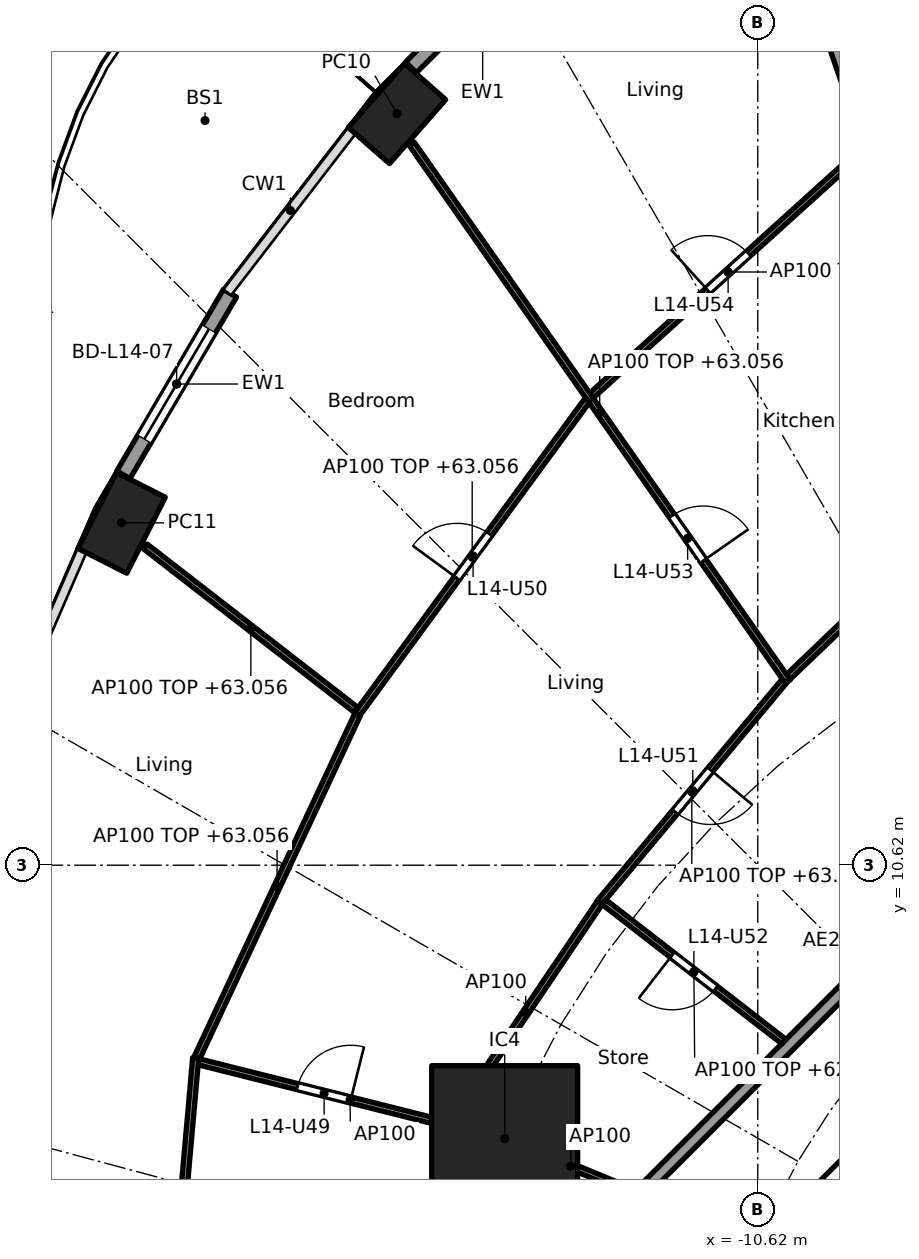
"""IFC4 building model, lengths in metres.
Left out: names, types, materials, properties, quantities, classifications, styles, units other than length and angle.
Written with IfcOpenShell. Run it as: python <this file> out.ifc"""

import sys

from ifc_helpers import new_model, si_unit, direction, frame, frame_2d, origin, origin_2d, place, context, subcontext, project, spatial, rectangle, hollow_rectangle, extrude, element, fill, save


model = new_model("IFC4")
c1 = context("Model", 3, precision=1e-05, world=origin(), true_north=direction((0.0, 1.0)))
c2 = subcontext(c1, "Body", "Model", "MODEL_VIEW")
j1 = project(units=[si_unit("LENGTHUNIT", "METRE"), si_unit("PLANEANGLEUNIT", "RADIAN")], contexts=[c1])
p1 = place(None, origin())
s1 = spatial("IfcSite", under=j1, at=p1, CompositionType="ELEMENT")
p2 = place(p1, origin())
s2 = spatial("IfcBuilding", under=s1, at=p2, CompositionType="ELEMENT")
p3 = place(p2, frame((0.0, 0.0, 60.3)))
s3 = spatial("IfcBuildingStorey", under=s2, at=p3, CompositionType="ELEMENT", Elevation=60.3)
for number, where, z_axis, x_axis in (
    (1, (-16.552, 22.981, 0.0), (0.0, 0.0, 1.0), (-0.66, -0.751, 0.0)),
    (2, (-21.082, 16.25, 0.0), (0.0, 0.0, 1.0), (-0.452, -0.892, 0.0)),
):
    element("IfcColumn", number, at=place(p3, frame(where, z_axis=z_axis, x_axis=x_axis)), inside=s3, PredefinedType="COLUMN", context=c2, shape_type="SweptSolid", body=[
        extrude(hollow_rectangle(XDim=1.4, YDim=0.9, WallThickness=0.05, at=origin_2d()), origin(), (0.0, 0.0, 1.0), 3.7),
    ])
p4 = place(p3, frame((-14.782, 6.123, 0.0), z_axis=(0.0, 0.0, 1.0), x_axis=(1.0, 0.0, 0.0)))
e3 = element("IfcColumn", 3, at=p4, inside=s3, PredefinedType="COLUMN", context=c2, shape_type="SweptSolid", body=[
    extrude(rectangle(XDim=2.4, YDim=2.4, at=origin_2d()), origin(), (0.0, 0.0, 1.0), 3.7),
])
p5 = place(p3, frame((-16.322, 23.74, 0.0), z_axis=(0.0, 0.0, 1.0), x_axis=(0.707803094595, 0.706409781417, 0.0)))
e4 = element("IfcWall", 4, at=p5, inside=s3, PredefinedType="SOLIDWALL", context=c2, shape_type="SweptSolid", body=[
    extrude(rectangle(XDim=3.329, YDim=0.25, at=frame_2d((1.665, 0.0))), origin(), (0.0, 0.0, 1.0), 3.44),
])
p6 = place(p5, frame((0.615, 0.0, 0.0)))
e5 = element("IfcOpeningElement", 5, at=p6, cuts=e4, PredefinedType="OPENING", context=c2, shape_type="SweptSolid", body=[
    extrude(rectangle(XDim=2.1, YDim=2.4, at=frame_2d((1.05, 1.2))), frame((0.0, 0.135, 0.0), z_axis=(0.0, -1.0, 0.0), x_axis=(1.0, 0.0, 0.0)), (0.0, 0.0, 1.0), 0.27),
])
p7 = place(p3, frame((-21.052, 17.04, 0.0), z_axis=(0.0, 0.0, 1.0), x_axis=(0.506311160839, 0.862350861546, 0.0)))
e6 = element("IfcWall", 6, at=p7, inside=s3, PredefinedType="SOLIDWALL", context=c2, shape_type="SweptSolid", body=[
    extrude(rectangle(XDim=3.462, YDim=0.25, at=frame_2d((1.731, 0.0))), origin(), (0.0, 0.0, 1.0), 3.44),
])
p8 = place(p7, frame((0.681, 0.0, 0.0)))
e7 = element("IfcOpeningElement", 7, at=p8, cuts=e6, PredefinedType="OPENING", context=c2, shape_type="SweptSolid", body=[
    extrude(rectangle(XDim=2.1, YDim=2.4, at=frame_2d((1.05, 1.2))), frame((0.0, 0.135, 0.0), z_axis=(0.0, -1.0, 0.0), x_axis=(1.0, 0.0, 0.0)), (0.0, 0.0, 1.0), 0.27),
])
p9 = place(p3, frame((-4.613, 9.988, 0.0), z_axis=(0.0, 0.0, 1.0), x_axis=(-0.707106781187, -0.707106781187, 0.0)))
e8 = element("IfcWall", 8, at=p9, inside=s3, PredefinedType="SHEAR", context=c2, shape_type="SweptSolid", body=[
    extrude(rectangle(XDim=7.602, YDim=0.6, at=frame_2d((3.801, 0.0))), origin(), (0.0, 0.0, 1.0), 3.44),
])
p10 = place(p9, frame((0.351, 0.0, 0.0)))
e9 = element("IfcOpeningElement", 9, at=p10, cuts=e8, PredefinedType="OPENING", context=c2, shape_type="SweptSolid", body=[
    extrude(rectangle(XDim=1.1, YDim=2.1, at=frame_2d((0.55, 1.05))), frame((0.0, 0.31, 0.0), z_axis=(0.0, -1.0, 0.0), x_axis=(1.0, 0.0, 0.0)), (0.0, 0.0, 1.0), 0.62),
])
p11 = place(p3, frame((-6.139, 14.829, 0.0), z_axis=(0.0, 0.0, 1.0), x_axis=(-0.327178799566, 0.944962450637, 0.0)))
e10 = element("IfcWall", 10, at=p11, inside=s3, PredefinedType="PARTITIONING", context=c2, shape_type="SweptSolid", body=[
    extrude(rectangle(XDim=13.517, YDim=0.2, at=frame_2d((6.759, 0.0))), origin(), (0.0, 0.0, 1.0), 2.756),
])
p12 = place(p3, frame((-5.275, 12.494, 0.0), z_axis=(0.0, 0.0, 1.0), x_axis=(-0.707106781187, -0.707106781187, 0.0)))
e11 = element("IfcWall", 11, at=p12, inside=s3, PredefinedType="PARTITIONING", context=c2, shape_type="SweptSolid", body=[
    extrude(rectangle(XDim=10.209, YDim=0.2, at=frame_2d((5.104, 0.0))), origin(), (0.0, 0.0, 1.0), 3.44),
])
p13 = place(p3, frame((-6.912, 16.782, 0.0), z_axis=(0.0, 0.0, 1.0), x_axis=(-0.722775679202, -0.691082713975, 0.0)))
e12 = element("IfcWall", 12, at=p13, inside=s3, PredefinedType="PARTITIONING", context=c2, shape_type="SweptSolid", body=[
    extrude(rectangle(XDim=4.437, YDim=0.1, at=frame_2d((2.219, 0.0))), origin(), (0.0, 0.0, 1.0), 2.756),
])
p14 = place(p3, frame((-8.861, 22.407, 0.0), z_axis=(0.0, 0.0, 1.0), x_axis=(-0.741713303551, -0.670717060567, 0.0)))
e13 = element("IfcWall", 13, at=p14, inside=s3, PredefinedType="PARTITIONING", context=c2, shape_type="SweptSolid", body=[
    extrude(rectangle(XDim=6.059, YDim=0.1, at=frame_2d((3.03, 0.0))), origin(), (0.0, 0.0, 1.0), 2.756),
])
p15 = place(p14, frame((2.58, 0.0, 0.0)))
e14 = element("IfcOpeningElement", 14, at=p15, cuts=e13, PredefinedType="OPENING", context=c2, shape_type="SweptSolid", body=[
    extrude(rectangle(XDim=0.9, YDim=2.1, at=frame_2d((0.45, 1.05))), frame((0.0, 0.06, 0.0), z_axis=(0.0, -1.0, 0.0), x_axis=(1.0, 0.0, 0.0)), (0.0, 0.0, 1.0), 0.12),
])
p16 = place(p3, frame((-10.126, 13.641, 0.0), z_axis=(0.0, 0.0, 1.0), x_axis=(-0.57313289907, 0.819462433552, 0.0)))
e15 = element("IfcWall", 15, at=p16, inside=s3, PredefinedType="PARTITIONING", context=c2, shape_type="SweptSolid", body=[
    extrude(rectangle(XDim=10.794, YDim=0.1, at=frame_2d((5.397, 0.0))), origin(), (0.0, 0.0, 1.0), 2.756),
])
p17 = place(p16, frame((2.424, 0.0, 0.0)))
e16 = element("IfcOpeningElement", 16, at=p17, cuts=e15, PredefinedType="OPENING", context=c2, shape_type="SweptSolid", body=[
    extrude(rectangle(XDim=0.9, YDim=2.1, at=frame_2d((0.45, 1.05))), frame((0.0, 0.06, 0.0), z_axis=(0.0, -1.0, 0.0), x_axis=(1.0, 0.0, 0.0)), (0.0, 0.0, 1.0), 0.12),
])
p18 = place(p3, frame((-10.187, 13.643, 0.0), z_axis=(0.0, 0.0, 1.0), x_axis=(-0.640807748916, -0.767701393075, 0.0)))
e17 = element("IfcWall", 17, at=p18, inside=s3, PredefinedType="PARTITIONING", context=c2, shape_type="SweptSolid", body=[
    extrude(rectangle(XDim=4.737, YDim=0.1, at=frame_2d((2.368, 0.0))), origin(), (0.0, 0.0, 1.0), 2.756),
])
p19 = place(p18, frame((1.893, 0.0, 0.0)))
e18 = element("IfcOpeningElement", 18, at=p19, cuts=e17, PredefinedType="OPENING", context=c2, shape_type="SweptSolid", body=[
    extrude(rectangle(XDim=0.9, YDim=2.1, at=frame_2d((0.45, 1.05))), frame((0.0, 0.06, 0.0), z_axis=(0.0, -1.0, 0.0), x_axis=(1.0, 0.0, 0.0)), (0.0, 0.0, 1.0), 0.12),
])
p20 = place(p3, frame((-13.421, 18.269, 0.0), z_axis=(0.0, 0.0, 1.0), x_axis=(-0.591206785834, -0.806520016109, 0.0)))
e19 = element("IfcWall", 19, at=p20, inside=s3, PredefinedType="PARTITIONING", context=c2, shape_type="SweptSolid", body=[
    extrude(rectangle(XDim=6.41, YDim=0.1, at=frame_2d((3.205, 0.0))), origin(), (0.0, 0.0, 1.0), 2.756),
])
p21 = place(p20, frame((2.73, 0.0, 0.0)))
e20 = element("IfcOpeningElement", 20, at=p21, cuts=e19, PredefinedType="OPENING", context=c2, shape_type="SweptSolid", body=[
    extrude(rectangle(XDim=0.9, YDim=2.1, at=frame_2d((0.45, 1.05))), frame((0.0, 0.06, 0.0), z_axis=(0.0, -1.0, 0.0), x_axis=(1.0, 0.0, 0.0)), (0.0, 0.0, 1.0), 0.12),
])
p22 = place(p3, frame((-10.19, 7.719, 0.0), z_axis=(0.0, 0.0, 1.0), x_axis=(-0.790253294643, 0.612780327937, 0.0)))
e21 = element("IfcWall", 21, at=p22, inside=s3, PredefinedType="PARTITIONING", context=c2, shape_type="SweptSolid", body=[
    extrude(rectangle(XDim=3.746, YDim=0.1, at=frame_2d((1.873, 0.0))), origin(), (0.0, 0.0, 1.0), 2.687),
])
p23 = place(p22, frame((1.423, 0.0, 0.0)))
e22 = element("IfcOpeningElement", 22, at=p23, cuts=e21, PredefinedType="OPENING", context=c2, shape_type="SweptSolid", body=[
    extrude(rectangle(XDim=0.9, YDim=2.1, at=frame_2d((0.45, 1.05))), frame((0.0, 0.06, 0.0), z_axis=(0.0, -1.0, 0.0), x_axis=(1.0, 0.0, 0.0)), (0.0, 0.0, 1.0), 0.12),
])
p24 = place(p3, frame((-13.218, 10.004, 0.0), z_axis=(0.0, 0.0, 1.0), x_axis=(-0.559126445155, -0.82908239538, 0.0)))
e23 = element("IfcWall", 23, at=p24, inside=s3, PredefinedType="PARTITIONING", context=c2, shape_type="SweptSolid", body=[
    extrude(rectangle(XDim=4.358, YDim=0.1, at=frame_2d((2.179, 0.0))), origin(), (0.0, 0.0, 1.0), 3.44),
])
p25 = place(p3, frame((-17.221, 13.171, 0.0), z_axis=(0.0, 0.0, 1.0), x_axis=(-0.790258254068, 0.612773932113, 0.0)))
e24 = element("IfcWall", 24, at=p25, inside=s3, PredefinedType="PARTITIONING", context=c2, shape_type="SweptSolid", body=[
    extrude(rectangle(XDim=4.392, YDim=0.1, at=frame_2d((2.196, 0.0))), origin(), (0.0, 0.0, 1.0), 2.756),
])
p26 = place(p3, frame((-17.203, 13.095, 0.0), z_axis=(0.0, 0.0, 1.0), x_axis=(-0.423892287987, -0.905712607942, 0.0)))
e25 = element("IfcWall", 25, at=p26, inside=s3, PredefinedType="PARTITIONING", context=c2, shape_type="SweptSolid", body=[
    extrude(rectangle(XDim=6.238, YDim=0.1, at=frame_2d((3.119, 0.0))), origin(), (0.0, 0.0, 1.0), 2.756),
])
p27 = place(p3, frame((-12.657, 5.243, 0.0), z_axis=(0.0, 0.0, 1.0), x_axis=(-0.923864733477, 0.382719158442, 0.0)))
e26 = element("IfcWall", 26, at=p27, inside=s3, PredefinedType="PARTITIONING", context=c2, shape_type="SweptSolid", body=[
    extrude(rectangle(XDim=2.25, YDim=0.1, at=frame_2d((1.125, 0.0))), origin(), (0.0, 0.0, 1.0), 3.44),
])
p28 = place(p3, frame((-14.831, 6.135, 0.0), z_axis=(0.0, 0.0, 1.0), x_axis=(-0.96988230015, 0.243574062362, 0.0)))
e27 = element("IfcWall", 27, at=p28, inside=s3, PredefinedType="PARTITIONING", context=c2, shape_type="SweptSolid", body=[
    extrude(rectangle(XDim=5.144, YDim=0.1, at=frame_2d((2.572, 0.0))), origin(), (0.0, 0.0, 1.0), 3.44),
])
p29 = place(p28, frame((2.561, 0.0, 0.0)))
e28 = element("IfcOpeningElement", 28, at=p29, cuts=e27, PredefinedType="OPENING", context=c2, shape_type="SweptSolid", body=[
    extrude(rectangle(XDim=0.9, YDim=2.1, at=frame_2d((0.45, 1.05))), frame((0.0, 0.06, 0.0), z_axis=(0.0, -1.0, 0.0), x_axis=(1.0, 0.0, 0.0)), (0.0, 0.0, 1.0), 0.12),
])
p30 = place(p3, frame((-15.686, 6.299, 0.0), z_axis=(0.0, 0.0, 1.0), x_axis=(-0.054651178503, -0.99850550759, 0.0)))
e29 = element("IfcWall", 29, at=p30, inside=s3, PredefinedType="PARTITIONING", context=c2, shape_type="SweptSolid", body=[
    extrude(rectangle(XDim=6.259, YDim=0.1, at=frame_2d((3.129, 0.0))), origin(), (0.0, 0.0, 1.0), 2.756),
])
p31 = place(p3, frame((-19.864, 7.45, 0.0), z_axis=(0.0, 0.0, 1.0), x_axis=(-0.088138375539, -0.996108240483, 0.0)))
e30 = element("IfcWall", 30, at=p31, inside=s3, PredefinedType="PARTITIONING", context=c2, shape_type="SweptSolid", body=[
    extrude(rectangle(XDim=7.429, YDim=0.1, at=frame_2d((3.714, 0.0))), origin(), (0.0, 0.0, 1.0), 2.756),
])
p32 = place(p31, frame((3.29, 0.0, 0.0)))
e31 = element("IfcOpeningElement", 31, at=p32, cuts=e30, PredefinedType="OPENING", context=c2, shape_type="SweptSolid", body=[
    extrude(rectangle(XDim=0.9, YDim=2.1, at=frame_2d((0.45, 1.05))), frame((0.0, 0.06, 0.0), z_axis=(0.0, -1.0, 0.0), x_axis=(1.0, 0.0, 0.0)), (0.0, 0.0, 1.0), 0.12),
])
p33 = place(p8, origin())
e32 = element("IfcDoor", 32, at=p33, inside=s3, OperationType="SLIDING_TO_LEFT", PredefinedType="DOOR", context=c2, shape_type="SweptSolid", body=[
    extrude(rectangle(XDim=2.1, YDim=2.4, at=frame_2d((1.05, 1.2))), frame((0.0, 0.025, 0.0), z_axis=(0.0, -1.0, 0.0), x_axis=(1.0, 0.0, 0.0)), (0.0, 0.0, 1.0), 0.05),
])
fill(e7, e32)
p34 = place(p29, frame((0.9, 0.0, 0.0), x_axis=(-1.0, 0.0, 0.0)))
e33 = element("IfcDoor", 33, at=p34, inside=s3, OperationType="SINGLE_SWING_RIGHT", PredefinedType="DOOR", context=c2, shape_type="SweptSolid", body=[
    extrude(rectangle(XDim=0.9, YDim=2.1, at=frame_2d((0.45, 1.05))), frame((0.0, 0.025, 0.0), z_axis=(0.0, -1.0, 0.0), x_axis=(1.0, 0.0, 0.0)), (0.0, 0.0, 1.0), 0.05),
])
fill(e28, e33)
p35 = place(p21, frame((0.9, 0.0, 0.0), x_axis=(-1.0, 0.0, 0.0)))
e34 = element("IfcDoor", 34, at=p35, inside=s3, OperationType="SINGLE_SWING_LEFT", PredefinedType="DOOR", context=c2, shape_type="SweptSolid", body=[
    extrude(rectangle(XDim=0.9, YDim=2.1, at=frame_2d((0.45, 1.05))), frame((0.0, 0.025, 0.0), z_axis=(0.0, -1.0, 0.0), x_axis=(1.0, 0.0, 0.0)), (0.0, 0.0, 1.0), 0.05),
])
fill(e20, e34)
p36 = place(p19, origin())
e35 = element("IfcDoor", 35, at=p36, inside=s3, OperationType="SINGLE_SWING_LEFT", PredefinedType="DOOR", context=c2, shape_type="SweptSolid", body=[
    extrude(rectangle(XDim=0.9, YDim=2.1, at=frame_2d((0.45, 1.05))), frame((0.0, 0.025, 0.0), z_axis=(0.0, -1.0, 0.0), x_axis=(1.0, 0.0, 0.0)), (0.0, 0.0, 1.0), 0.05),
])
fill(e18, e35)
p37 = place(p23, origin())
e36 = element("IfcDoor", 36, at=p37, inside=s3, OperationType="SINGLE_SWING_RIGHT", PredefinedType="DOOR", context=c2, shape_type="SweptSolid", body=[
    extrude(rectangle(XDim=0.9, YDim=2.1, at=frame_2d((0.45, 1.05))), frame((0.0, 0.025, 0.0), z_axis=(0.0, -1.0, 0.0), x_axis=(1.0, 0.0, 0.0)), (0.0, 0.0, 1.0), 0.05),
])
fill(e22, e36)
p38 = place(p17, frame((0.9, 0.0, 0.0), x_axis=(-1.0, 0.0, 0.0)))
e37 = element("IfcDoor", 37, at=p38, inside=s3, OperationType="SINGLE_SWING_RIGHT", PredefinedType="DOOR", context=c2, shape_type="SweptSolid", body=[
    extrude(rectangle(XDim=0.9, YDim=2.1, at=frame_2d((0.45, 1.05))), frame((0.0, 0.025, 0.0), z_axis=(0.0, -1.0, 0.0), x_axis=(1.0, 0.0, 0.0)), (0.0, 0.0, 1.0), 0.05),
])
fill(e16, e37)
p39 = place(p15, frame((0.9, 0.0, 0.0), x_axis=(-1.0, 0.0, 0.0)))
e38 = element("IfcDoor", 38, at=p39, inside=s3, OperationType="SINGLE_SWING_LEFT", PredefinedType="DOOR", context=c2, shape_type="SweptSolid", body=[
    extrude(rectangle(XDim=0.9, YDim=2.1, at=frame_2d((0.45, 1.05))), frame((0.0, 0.025, 0.0), z_axis=(0.0, -1.0, 0.0), x_axis=(1.0, 0.0, 0.0)), (0.0, 0.0, 1.0), 0.05),
])
fill(e14, e38)
save(model, sys.argv[1])
